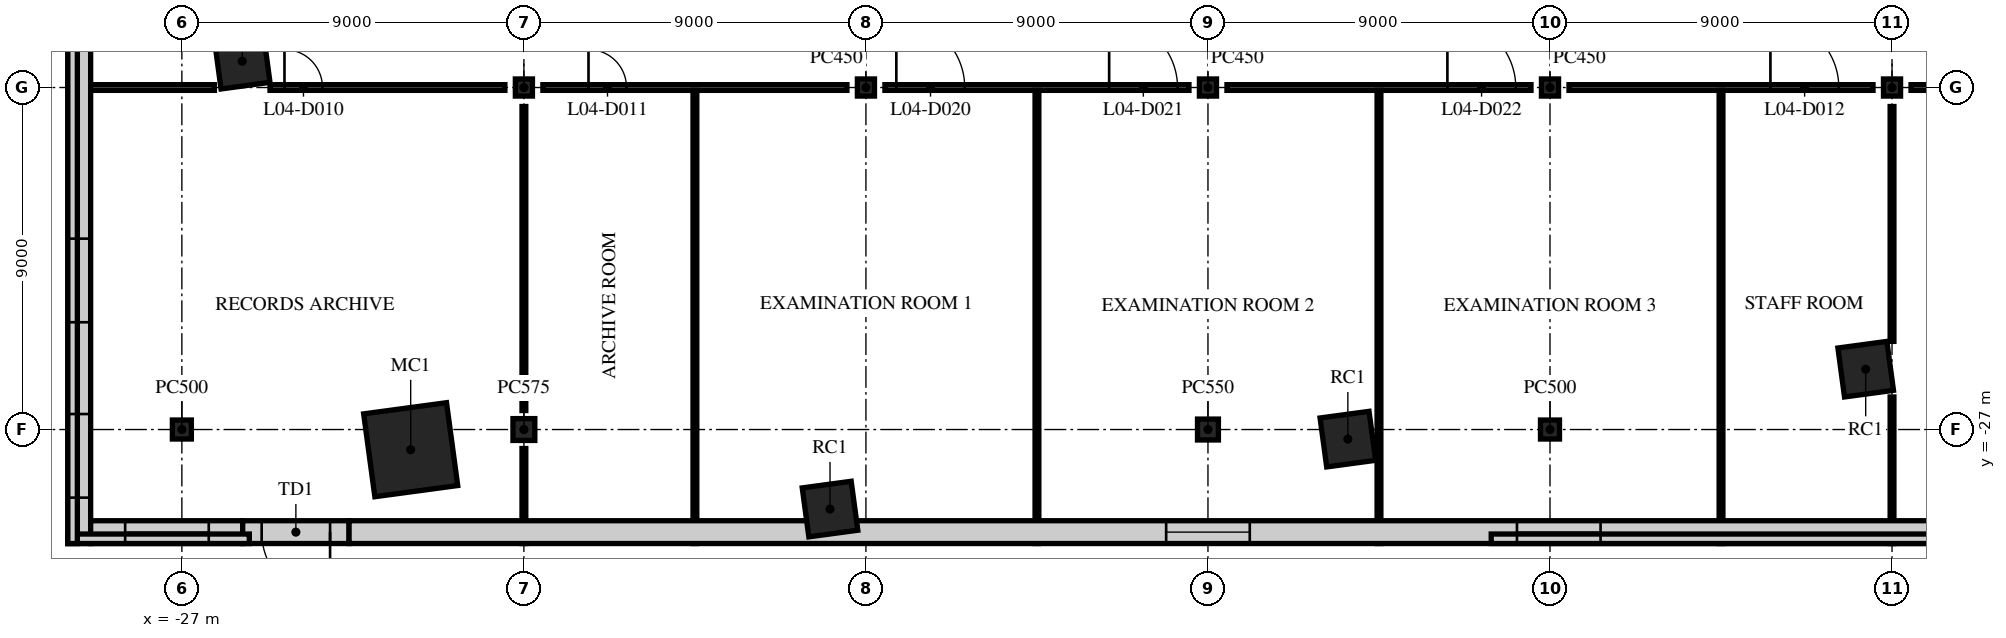
"""IFC4 building model, lengths in metres.
Left out: names, types, materials, properties, quantities, classifications, styles, units other than length and angle.
Written with IfcOpenShell. Run it as: python <this file> out.ifc"""

import sys

from ifc_helpers import new_model, si_unit, direction, frame, frame_2d, origin, origin_2d, place, context, subcontext, project, spatial, rectangle, extrude, element, fill, save


model = new_model("IFC4")
c1 = context("Model", 3, precision=1e-05, world=origin(), true_north=direction((0.0, 1.0)))
c2 = subcontext(c1, "Body", "Model", "MODEL_VIEW")
j1 = project(units=[si_unit("LENGTHUNIT", "METRE"), si_unit("PLANEANGLEUNIT", "RADIAN")], contexts=[c1])
p1 = place(None, origin())
s1 = spatial("IfcSite", under=j1, at=p1, CompositionType="ELEMENT")
p2 = place(p1, origin())
s2 = spatial("IfcBuilding", under=s1, at=p2, CompositionType="ELEMENT")
p3 = place(p2, frame((0.0, 0.0, 18.0)))
s3 = spatial("IfcBuildingStorey", under=s2, at=p3, CompositionType="ELEMENT", Elevation=18.0)
p4 = place(p3, frame((-27.0, -27.0, 0.0), z_axis=(0.0, 0.0, 1.0), x_axis=(1.0, 0.0, 0.0)))
e1 = element("IfcColumn", 1, at=p4, inside=s3, PredefinedType="COLUMN", context=c2, shape_type="SweptSolid", body=[
    extrude(rectangle(XDim=0.5, YDim=0.5, at=origin_2d()), origin(), (0.0, 0.0, 1.0), 4.5),
])
p5 = place(p3, frame((-18.0, -27.0, 0.0), z_axis=(0.0, 0.0, 1.0), x_axis=(1.0, 0.0, 0.0)))
e2 = element("IfcColumn", 2, at=p5, inside=s3, PredefinedType="COLUMN", context=c2, shape_type="SweptSolid", body=[
    extrude(rectangle(XDim=0.575, YDim=0.575, at=origin_2d()), origin(), (0.0, 0.0, 1.0), 4.5),
])
for number, where, z_axis, x_axis in (
    (3, (-18.0, -18.0, 0.0), (0.0, 0.0, 1.0), (1.0, 0.0, 0.0)),
    (4, (-9.0, -18.0, 0.0), (0.0, 0.0, 1.0), (1.0, 0.0, 0.0)),
):
    element("IfcColumn", number, at=place(p3, frame(where, z_axis=z_axis, x_axis=x_axis)), inside=s3, PredefinedType="COLUMN", context=c2, shape_type="SweptSolid", body=[
        extrude(rectangle(XDim=0.45, YDim=0.45, at=origin_2d()), origin(), (0.0, 0.0, 1.0), 4.5),
    ])
p6 = place(p3, frame((0.0, -27.0, 0.0), z_axis=(0.0, 0.0, 1.0), x_axis=(1.0, 0.0, 0.0)))
e5 = element("IfcColumn", 5, at=p6, inside=s3, PredefinedType="COLUMN", context=c2, shape_type="SweptSolid", body=[
    extrude(rectangle(XDim=0.55, YDim=0.55, at=origin_2d()), origin(), (0.0, 0.0, 1.0), 4.5),
])
p7 = place(p3, frame((0.0, -18.0, 0.0), z_axis=(0.0, 0.0, 1.0), x_axis=(1.0, 0.0, 0.0)))
e6 = element("IfcColumn", 6, at=p7, inside=s3, PredefinedType="COLUMN", context=c2, shape_type="SweptSolid", body=[
    extrude(rectangle(XDim=0.45, YDim=0.45, at=origin_2d()), origin(), (0.0, 0.0, 1.0), 4.5),
])
p8 = place(p3, frame((9.0, -27.0, 0.0), z_axis=(0.0, 0.0, 1.0), x_axis=(1.0, 0.0, 0.0)))
e7 = element("IfcColumn", 7, at=p8, inside=s3, PredefinedType="COLUMN", context=c2, shape_type="SweptSolid", body=[
    extrude(rectangle(XDim=0.5, YDim=0.5, at=origin_2d()), origin(), (0.0, 0.0, 1.0), 4.5),
])
for number, where, z_axis, x_axis in (
    (8, (9.0, -18.0, 0.0), (0.0, 0.0, 1.0), (1.0, 0.0, 0.0)),
    (9, (18.0, -18.0, 0.0), (0.0, 0.0, 1.0), (1.0, 0.0, 0.0)),
):
    element("IfcColumn", number, at=place(p3, frame(where, z_axis=z_axis, x_axis=x_axis)), inside=s3, PredefinedType="COLUMN", context=c2, shape_type="SweptSolid", body=[
        extrude(rectangle(XDim=0.45, YDim=0.45, at=origin_2d()), origin(), (0.0, 0.0, 1.0), 4.5),
    ])
p9 = place(p3, frame((-25.412, -17.307, 0.0), z_axis=(0.0, 0.0, 1.0), x_axis=(0.991001197216, 0.133853005627, 0.0)))
e10 = element("IfcColumn", 10, at=p9, inside=s3, PredefinedType="COLUMN", context=c2, shape_type="SweptSolid", body=[
    extrude(rectangle(XDim=1.3, YDim=1.3, at=origin_2d()), origin(), (0.0, 0.0, 1.0), 4.5),
])
p10 = place(p3, frame((-20.979, -27.531, 0.0), z_axis=(0.0, 0.0, 1.0), x_axis=(0.991001197216, 0.133853005627, 0.0)))
e11 = element("IfcColumn", 11, at=p10, inside=s3, PredefinedType="COLUMN", context=c2, shape_type="SweptSolid", body=[
    extrude(rectangle(XDim=2.2, YDim=2.2, at=origin_2d()), origin(), (0.0, 0.0, 1.0), 4.5),
])
for number, where, z_axis, x_axis in (
    (12, (-9.945, -29.093, 0.0), (0.0, 0.0, 1.0), (0.991, 0.134, 0.0)),
    (13, (3.681, -27.253, 0.0), (0.0, 0.0, 1.0), (0.991, 0.134, 0.0)),
    (14, (17.307, -25.412, 0.0), (0.0, 0.0, 1.0), (0.991, 0.134, 0.0)),
):
    element("IfcColumn", number, at=place(p3, frame(where, z_axis=z_axis, x_axis=x_axis)), inside=s3, PredefinedType="COLUMN", context=c2, shape_type="SweptSolid", body=[
        extrude(rectangle(XDim=1.3, YDim=1.3, at=origin_2d()), origin(), (0.0, 0.0, 1.0), 4.5),
    ])
p11 = place(p3, frame((-30.0, -18.0, 0.0), z_axis=(0.0, 0.0, 1.0), x_axis=(1.0, 0.0, 0.0)))
e15 = element("IfcWall", 15, at=p11, inside=s3, PredefinedType="PARTITIONING", context=c2, shape_type="SweptSolid", body=[
    extrude(rectangle(XDim=3.857, YDim=0.15, at=frame_2d((1.928, 0.0))), origin(), (0.0, 0.0, 1.0), 4.05),
])
p12 = place(p3, frame((-24.681, -18.0, 0.0), z_axis=(0.0, 0.0, 1.0), x_axis=(1.0, 0.0, 0.0)))
e16 = element("IfcWall", 16, at=p12, inside=s3, PredefinedType="PARTITIONING", context=c2, shape_type="SweptSolid", body=[
    extrude(rectangle(XDim=6.181, YDim=0.15, at=frame_2d((3.09, 0.0))), origin(), (0.0, 0.0, 1.0), 3.53),
])
p13 = place(p12, frame((0.381, 0.0, 0.0)))
e17 = element("IfcOpeningElement", 17, at=p13, cuts=e16, PredefinedType="OPENING", context=c2, shape_type="SweptSolid", body=[
    extrude(rectangle(XDim=1.0, YDim=2.1, at=frame_2d((0.5, 1.05))), frame((0.0, 0.085, 0.0), z_axis=(0.0, -1.0, 0.0), x_axis=(1.0, 0.0, 0.0)), (0.0, 0.0, 1.0), 0.17),
])
p14 = place(p3, frame((-17.5, -18.0, 0.0), z_axis=(0.0, 0.0, 1.0), x_axis=(1.0, 0.0, 0.0)))
e18 = element("IfcWall", 18, at=p14, inside=s3, PredefinedType="PARTITIONING", context=c2, shape_type="SweptSolid", body=[
    extrude(rectangle(XDim=8.0, YDim=0.15, at=frame_2d((4.0, 0.0))), origin(), (0.0, 0.0, 1.0), 3.53),
])
p15 = place(p14, frame((1.2, 0.0, 0.0)))
e19 = element("IfcOpeningElement", 19, at=p15, cuts=e18, PredefinedType="OPENING", context=c2, shape_type="SweptSolid", body=[
    extrude(rectangle(XDim=1.0, YDim=2.1, at=frame_2d((0.5, 1.05))), frame((0.0, 0.085, 0.0), z_axis=(0.0, -1.0, 0.0), x_axis=(1.0, 0.0, 0.0)), (0.0, 0.0, 1.0), 0.17),
])
p16 = place(p3, frame((-8.5, -18.0, 0.0), z_axis=(0.0, 0.0, 1.0), x_axis=(1.0, 0.0, 0.0)))
e20 = element("IfcWall", 20, at=p16, inside=s3, PredefinedType="PARTITIONING", context=c2, shape_type="SweptSolid", body=[
    extrude(rectangle(XDim=8.0, YDim=0.15, at=frame_2d((4.0, 0.0))), origin(), (0.0, 0.0, 1.0), 3.53),
])
p17 = place(p16, frame((0.3, 0.0, 0.0)))
e21 = element("IfcOpeningElement", 21, at=p17, cuts=e20, PredefinedType="OPENING", context=c2, shape_type="SweptSolid", body=[
    extrude(rectangle(XDim=1.8, YDim=2.1, at=frame_2d((0.9, 1.05))), frame((0.0, 0.085, 0.0), z_axis=(0.0, -1.0, 0.0), x_axis=(1.0, 0.0, 0.0)), (0.0, 0.0, 1.0), 0.17),
])
p18 = place(p16, frame((5.9, 0.0, 0.0)))
e22 = element("IfcOpeningElement", 22, at=p18, cuts=e20, PredefinedType="OPENING", context=c2, shape_type="SweptSolid", body=[
    extrude(rectangle(XDim=1.8, YDim=2.1, at=frame_2d((0.9, 1.05))), frame((0.0, 0.085, 0.0), z_axis=(0.0, -1.0, 0.0), x_axis=(1.0, 0.0, 0.0)), (0.0, 0.0, 1.0), 0.17),
])
p19 = place(p3, frame((0.5, -18.0, 0.0), z_axis=(0.0, 0.0, 1.0), x_axis=(1.0, 0.0, 0.0)))
e23 = element("IfcWall", 23, at=p19, inside=s3, PredefinedType="PARTITIONING", context=c2, shape_type="SweptSolid", body=[
    extrude(rectangle(XDim=8.0, YDim=0.15, at=frame_2d((4.0, 0.0))), origin(), (0.0, 0.0, 1.0), 3.53),
])
p20 = place(p19, frame((5.8, 0.0, 0.0)))
e24 = element("IfcOpeningElement", 24, at=p20, cuts=e23, PredefinedType="OPENING", context=c2, shape_type="SweptSolid", body=[
    extrude(rectangle(XDim=1.8, YDim=2.1, at=frame_2d((0.9, 1.05))), frame((0.0, 0.085, 0.0), z_axis=(0.0, -1.0, 0.0), x_axis=(1.0, 0.0, 0.0)), (0.0, 0.0, 1.0), 0.17),
])
p21 = place(p3, frame((9.5, -18.0, 0.0), z_axis=(0.0, 0.0, 1.0), x_axis=(1.0, 0.0, 0.0)))
e25 = element("IfcWall", 25, at=p21, inside=s3, PredefinedType="PARTITIONING", context=c2, shape_type="SweptSolid", body=[
    extrude(rectangle(XDim=8.0, YDim=0.15, at=frame_2d((4.0, 0.0))), origin(), (0.0, 0.0, 1.0), 3.53),
])
p22 = place(p21, frame((5.3, 0.0, 0.0)))
e26 = element("IfcOpeningElement", 26, at=p22, cuts=e25, PredefinedType="OPENING", context=c2, shape_type="SweptSolid", body=[
    extrude(rectangle(XDim=1.8, YDim=2.1, at=frame_2d((0.9, 1.05))), frame((0.0, 0.085, 0.0), z_axis=(0.0, -1.0, 0.0), x_axis=(1.0, 0.0, 0.0)), (0.0, 0.0, 1.0), 0.17),
])
p23 = place(p3, frame((18.5, -18.0, 0.0), z_axis=(0.0, 0.0, 1.0), x_axis=(1.0, 0.0, 0.0)))
e27 = element("IfcWall", 27, at=p23, inside=s3, PredefinedType="PARTITIONING", context=c2, shape_type="SweptSolid", body=[
    extrude(rectangle(XDim=8.0, YDim=0.15, at=frame_2d((4.0, 0.0))), origin(), (0.0, 0.0, 1.0), 3.53),
])
p24 = place(p23, frame((5.0, 0.0, 0.0)))
e28 = element("IfcOpeningElement", 28, at=p24, cuts=e27, PredefinedType="OPENING", context=c2, shape_type="SweptSolid", body=[
    extrude(rectangle(XDim=1.0, YDim=2.1, at=frame_2d((0.5, 1.05))), frame((0.0, 0.085, 0.0), z_axis=(0.0, -1.0, 0.0), x_axis=(1.0, 0.0, 0.0)), (0.0, 0.0, 1.0), 0.17),
])
p25 = place(p3, frame((-18.0, -30.0, 0.0), z_axis=(0.0, 0.0, 1.0), x_axis=(0.0, 1.0, 0.0)))
e29 = element("IfcWall", 29, at=p25, inside=s3, PredefinedType="PARTITIONING", context=c2, shape_type="SweptSolid", body=[
    extrude(rectangle(XDim=2.5, YDim=0.1, at=frame_2d((1.25, 0.0))), origin(), (0.0, 0.0, 1.0), 3.23),
])
p26 = place(p3, frame((-18.0, -26.5, 0.0), z_axis=(0.0, 0.0, 1.0), x_axis=(0.0, 1.0, 0.0)))
e30 = element("IfcWall", 30, at=p26, inside=s3, PredefinedType="PARTITIONING", context=c2, shape_type="SweptSolid", body=[
    extrude(rectangle(XDim=8.0, YDim=0.1, at=frame_2d((4.0, 0.0))), origin(), (0.0, 0.0, 1.0), 3.53),
])
for number, where, z_axis, x_axis in (
    (31, (-13.5, -30.0, 0.0), (0.0, 0.0, 1.0), (0.0, 1.0, 0.0)),
    (32, (-4.5, -30.0, 0.0), (0.0, 0.0, 1.0), (0.0, 1.0, 0.0)),
    (33, (4.5, -30.0, 0.0), (0.0, 0.0, 1.0), (0.0, 1.0, 0.0)),
    (34, (13.5, -30.0, 0.0), (0.0, 0.0, 1.0), (0.0, 1.0, 0.0)),
):
    element("IfcWall", number, at=place(p3, frame(where, z_axis=z_axis, x_axis=x_axis)), inside=s3, PredefinedType="PARTITIONING", context=c2, shape_type="SweptSolid", body=[
        extrude(rectangle(XDim=11.925, YDim=0.1, at=frame_2d((5.962, 0.0))), origin(), (0.0, 0.0, 1.0), 3.23),
    ])
p27 = place(p3, frame((18.0, -30.0, 0.0), z_axis=(0.0, 0.0, 1.0), x_axis=(0.0, 1.0, 0.0)))
e35 = element("IfcWall", 35, at=p27, inside=s3, PredefinedType="PARTITIONING", context=c2, shape_type="SweptSolid", body=[
    extrude(rectangle(XDim=3.857, YDim=0.1, at=frame_2d((1.928, 0.0))), origin(), (0.0, 0.0, 1.0), 4.05),
])
p28 = place(p3, frame((18.0, -24.681, 0.0), z_axis=(0.0, 0.0, 1.0), x_axis=(0.0, 1.0, 0.0)))
e36 = element("IfcWall", 36, at=p28, inside=s3, PredefinedType="PARTITIONING", context=c2, shape_type="SweptSolid", body=[
    extrude(rectangle(XDim=6.181, YDim=0.1, at=frame_2d((3.09, 0.0))), origin(), (0.0, 0.0, 1.0), 3.53),
])
p29 = place(p3, frame((-29.7, -1.4, 0.0), z_axis=(0.0, 0.0, 1.0), x_axis=(0.0, -1.0, 0.0)))
e37 = element("IfcWall", 37, at=p29, inside=s3, PredefinedType="STANDARD", context=c2, shape_type="SweptSolid", body=[
    extrude(rectangle(XDim=28.6, YDim=0.6, at=frame_2d((14.3, 0.0))), origin(), (0.0, 0.0, 1.0), 4.05),
])
p30 = place(p29, frame((6.731, 0.0, 0.9)))
e38 = element("IfcOpeningElement", 38, at=p30, cuts=e37, PredefinedType="OPENING", context=c2, shape_type="SweptSolid", body=[
    extrude(rectangle(XDim=2.2, YDim=3.0, at=frame_2d((1.1, 1.5))), frame((0.0, 0.31, 0.0), z_axis=(0.0, -1.0, 0.0), x_axis=(1.0, 0.0, 0.0)), (0.0, 0.0, 1.0), 0.62),
])
p31 = place(p29, frame((20.577, 0.0, 0.9)))
e39 = element("IfcOpeningElement", 39, at=p31, cuts=e37, PredefinedType="OPENING", context=c2, shape_type="SweptSolid", body=[
    extrude(rectangle(XDim=2.2, YDim=3.0, at=frame_2d((1.1, 1.5))), frame((0.0, 0.31, 0.0), z_axis=(0.0, -1.0, 0.0), x_axis=(1.0, 0.0, 0.0)), (0.0, 0.0, 1.0), 0.62),
])
p32 = place(p29, frame((25.192, 0.0, 0.9)))
e40 = element("IfcOpeningElement", 40, at=p32, cuts=e37, PredefinedType="OPENING", context=c2, shape_type="SweptSolid", body=[
    extrude(rectangle(XDim=2.2, YDim=3.0, at=frame_2d((1.1, 1.5))), frame((0.0, 0.31, 0.0), z_axis=(0.0, -1.0, 0.0), x_axis=(1.0, 0.0, 0.0)), (0.0, 0.0, 1.0), 0.62),
])
p33 = place(p3, frame((-29.4, -29.7, 0.0), z_axis=(0.0, 0.0, 1.0), x_axis=(1.0, 0.0, 0.0)))
e41 = element("IfcWall", 41, at=p33, inside=s3, PredefinedType="STANDARD", context=c2, shape_type="SweptSolid", body=[
    extrude(rectangle(XDim=4.0, YDim=0.6, at=frame_2d((2.0, 0.0))), origin(), (0.0, 0.0, 1.0), 4.05),
])
p34 = place(p33, frame((0.908, 0.0, 0.9)))
e42 = element("IfcOpeningElement", 42, at=p34, cuts=e41, PredefinedType="OPENING", context=c2, shape_type="SweptSolid", body=[
    extrude(rectangle(XDim=2.2, YDim=3.0, at=frame_2d((1.1, 1.5))), frame((0.0, 0.31, 0.0), z_axis=(0.0, -1.0, 0.0), x_axis=(1.0, 0.0, 0.0)), (0.0, 0.0, 1.0), 0.62),
])
p35 = place(p3, frame((-22.6, -29.7, 0.0), z_axis=(0.0, 0.0, 1.0), x_axis=(-1.0, 0.0, 0.0)))
e43 = element("IfcWall", 43, at=p35, inside=s3, PredefinedType="STANDARD", context=c2, shape_type="SweptSolid", body=[
    extrude(rectangle(XDim=2.8, YDim=0.6, at=frame_2d((1.4, 0.0))), origin(), (0.0, 0.0, 1.0), 4.05),
])
p36 = place(p35, frame((0.5, 0.0, 0.0)))
e44 = element("IfcOpeningElement", 44, at=p36, cuts=e43, PredefinedType="OPENING", context=c2, shape_type="SweptSolid", body=[
    extrude(rectangle(XDim=1.8, YDim=2.4, at=frame_2d((0.9, 1.2))), frame((0.0, 0.31, 0.0), z_axis=(0.0, -1.0, 0.0), x_axis=(1.0, 0.0, 0.0)), (0.0, 0.0, 1.0), 0.62),
])
p37 = place(p3, frame((-22.6, -29.7, 0.0), z_axis=(0.0, 0.0, 1.0), x_axis=(1.0, 0.0, 0.0)))
e45 = element("IfcWall", 45, at=p37, inside=s3, PredefinedType="STANDARD", context=c2, shape_type="SweptSolid", body=[
    extrude(rectangle(XDim=45.2, YDim=0.6, at=frame_2d((22.6, 0.0))), origin(), (0.0, 0.0, 1.0), 4.05),
])
p38 = place(p37, frame((21.5, 0.0, 0.9)))
e46 = element("IfcOpeningElement", 46, at=p38, cuts=e45, PredefinedType="OPENING", context=c2, shape_type="SweptSolid", body=[
    extrude(rectangle(XDim=2.2, YDim=3.0, at=frame_2d((1.1, 1.5))), frame((0.0, 0.31, 0.0), z_axis=(0.0, -1.0, 0.0), x_axis=(1.0, 0.0, 0.0)), (0.0, 0.0, 1.0), 0.62),
])
p39 = place(p37, frame((30.731, 0.0, 0.9)))
e47 = element("IfcOpeningElement", 47, at=p39, cuts=e45, PredefinedType="OPENING", context=c2, shape_type="SweptSolid", body=[
    extrude(rectangle(XDim=2.2, YDim=3.0, at=frame_2d((1.1, 1.5))), frame((0.0, 0.31, 0.0), z_axis=(0.0, -1.0, 0.0), x_axis=(1.0, 0.0, 0.0)), (0.0, 0.0, 1.0), 0.62),
])
p40 = place(p3, frame((-30.0, -29.875, 4.5), z_axis=(0.0, 0.0, 1.0), x_axis=(1.0, 0.0, 0.0)))
e48 = element("IfcWall", 48, at=p40, inside=s3, PredefinedType="PARAPET", context=c2, shape_type="SweptSolid", body=[
    extrude(rectangle(XDim=4.775, YDim=0.25, at=frame_2d((2.387, 0.0))), origin(), (0.0, 0.0, 1.0), 1.1),
])
for number, where, z_axis, x_axis in (
    (49, (7.453, -29.875, 4.5), (0.0, 0.0, 1.0), (1.0, 0.0, 0.0)),
    (50, (-29.875, -7.453, 4.5), (0.0, 0.0, 1.0), (0.0, -1.0, 0.0)),
):
    element("IfcWall", number, at=place(p3, frame(where, z_axis=z_axis, x_axis=x_axis)), inside=s3, PredefinedType="PARAPET", context=c2, shape_type="SweptSolid", body=[
        extrude(rectangle(XDim=22.547, YDim=0.25, at=frame_2d((11.273, 0.0))), origin(), (0.0, 0.0, 1.0), 1.1),
    ])
p41 = place(p13, origin())
e51 = element("IfcDoor", 51, at=p41, inside=s3, OperationType="SINGLE_SWING_RIGHT", PredefinedType="DOOR", context=c2, shape_type="SweptSolid", body=[
    extrude(rectangle(XDim=1.0, YDim=2.1, at=frame_2d((0.5, 1.05))), frame((0.0, 0.025, 0.0), z_axis=(0.0, -1.0, 0.0), x_axis=(1.0, 0.0, 0.0)), (0.0, 0.0, 1.0), 0.05),
])
fill(e17, e51)
p42 = place(p15, origin())
e52 = element("IfcDoor", 52, at=p42, inside=s3, OperationType="SINGLE_SWING_LEFT", PredefinedType="DOOR", context=c2, shape_type="SweptSolid", body=[
    extrude(rectangle(XDim=1.0, YDim=2.1, at=frame_2d((0.5, 1.05))), frame((0.0, 0.025, 0.0), z_axis=(0.0, -1.0, 0.0), x_axis=(1.0, 0.0, 0.0)), (0.0, 0.0, 1.0), 0.05),
])
fill(e19, e52)
p43 = place(p22, origin())
e53 = element("IfcDoor", 53, at=p43, inside=s3, OperationType="DOUBLE_DOOR_SINGLE_SWING", PredefinedType="DOOR", context=c2, shape_type="SweptSolid", body=[
    extrude(rectangle(XDim=1.8, YDim=2.1, at=frame_2d((0.9, 1.05))), frame((0.0, 0.025, 0.0), z_axis=(0.0, -1.0, 0.0), x_axis=(1.0, 0.0, 0.0)), (0.0, 0.0, 1.0), 0.05),
])
fill(e26, e53)
p44 = place(p17, origin())
e54 = element("IfcDoor", 54, at=p44, inside=s3, OperationType="DOUBLE_DOOR_SINGLE_SWING", PredefinedType="DOOR", context=c2, shape_type="SweptSolid", body=[
    extrude(rectangle(XDim=1.8, YDim=2.1, at=frame_2d((0.9, 1.05))), frame((0.0, 0.025, 0.0), z_axis=(0.0, -1.0, 0.0), x_axis=(1.0, 0.0, 0.0)), (0.0, 0.0, 1.0), 0.05),
])
fill(e21, e54)
p45 = place(p18, origin())
e55 = element("IfcDoor", 55, at=p45, inside=s3, OperationType="DOUBLE_DOOR_SINGLE_SWING", PredefinedType="DOOR", context=c2, shape_type="SweptSolid", body=[
    extrude(rectangle(XDim=1.8, YDim=2.1, at=frame_2d((0.9, 1.05))), frame((0.0, 0.025, 0.0), z_axis=(0.0, -1.0, 0.0), x_axis=(1.0, 0.0, 0.0)), (0.0, 0.0, 1.0), 0.05),
])
fill(e22, e55)
p46 = place(p20, origin())
e56 = element("IfcDoor", 56, at=p46, inside=s3, OperationType="DOUBLE_DOOR_SINGLE_SWING", PredefinedType="DOOR", context=c2, shape_type="SweptSolid", body=[
    extrude(rectangle(XDim=1.8, YDim=2.1, at=frame_2d((0.9, 1.05))), frame((0.0, 0.025, 0.0), z_axis=(0.0, -1.0, 0.0), x_axis=(1.0, 0.0, 0.0)), (0.0, 0.0, 1.0), 0.05),
])
fill(e24, e56)
p47 = place(p31, origin())
e57 = element("IfcWindow", 57, at=p47, inside=s3, PartitioningType="SINGLE_PANEL", PredefinedType="WINDOW", context=c2, shape_type="SweptSolid", body=[
    extrude(rectangle(XDim=2.2, YDim=3.0, at=frame_2d((1.1, 1.5))), frame((0.0, 0.03, 0.0), z_axis=(0.0, -1.0, 0.0), x_axis=(1.0, 0.0, 0.0)), (0.0, 0.0, 1.0), 0.06),
])
fill(e39, e57)
p48 = place(p32, origin())
e58 = element("IfcWindow", 58, at=p48, inside=s3, PartitioningType="SINGLE_PANEL", PredefinedType="WINDOW", context=c2, shape_type="SweptSolid", body=[
    extrude(rectangle(XDim=2.2, YDim=3.0, at=frame_2d((1.1, 1.5))), frame((0.0, 0.03, 0.0), z_axis=(0.0, -1.0, 0.0), x_axis=(1.0, 0.0, 0.0)), (0.0, 0.0, 1.0), 0.06),
])
fill(e40, e58)
p49 = place(p34, origin())
e59 = element("IfcWindow", 59, at=p49, inside=s3, PartitioningType="SINGLE_PANEL", PredefinedType="WINDOW", context=c2, shape_type="SweptSolid", body=[
    extrude(rectangle(XDim=2.2, YDim=3.0, at=frame_2d((1.1, 1.5))), frame((0.0, 0.03, 0.0), z_axis=(0.0, -1.0, 0.0), x_axis=(1.0, 0.0, 0.0)), (0.0, 0.0, 1.0), 0.06),
])
fill(e42, e59)
p50 = place(p36, origin())
e60 = element("IfcDoor", 60, at=p50, inside=s3, OperationType="DOUBLE_DOOR_SINGLE_SWING", PredefinedType="DOOR", context=c2, shape_type="SweptSolid", body=[
    extrude(rectangle(XDim=1.8, YDim=2.4, at=frame_2d((0.9, 1.2))), frame((0.0, 0.025, 0.0), z_axis=(0.0, -1.0, 0.0), x_axis=(1.0, 0.0, 0.0)), (0.0, 0.0, 1.0), 0.05),
])
fill(e44, e60)
p51 = place(p38, origin())
e61 = element("IfcWindow", 61, at=p51, inside=s3, PartitioningType="SINGLE_PANEL", PredefinedType="WINDOW", context=c2, shape_type="SweptSolid", body=[
    extrude(rectangle(XDim=2.2, YDim=3.0, at=frame_2d((1.1, 1.5))), frame((0.0, 0.03, 0.0), z_axis=(0.0, -1.0, 0.0), x_axis=(1.0, 0.0, 0.0)), (0.0, 0.0, 1.0), 0.06),
])
fill(e46, e61)
p52 = place(p39, origin())
e62 = element("IfcWindow", 62, at=p52, inside=s3, PartitioningType="SINGLE_PANEL", PredefinedType="WINDOW", context=c2, shape_type="SweptSolid", body=[
    extrude(rectangle(XDim=2.2, YDim=3.0, at=frame_2d((1.1, 1.5))), frame((0.0, 0.03, 0.0), z_axis=(0.0, -1.0, 0.0), x_axis=(1.0, 0.0, 0.0)), (0.0, 0.0, 1.0), 0.06),
])
fill(e47, e62)
save(model, sys.argv[1])
